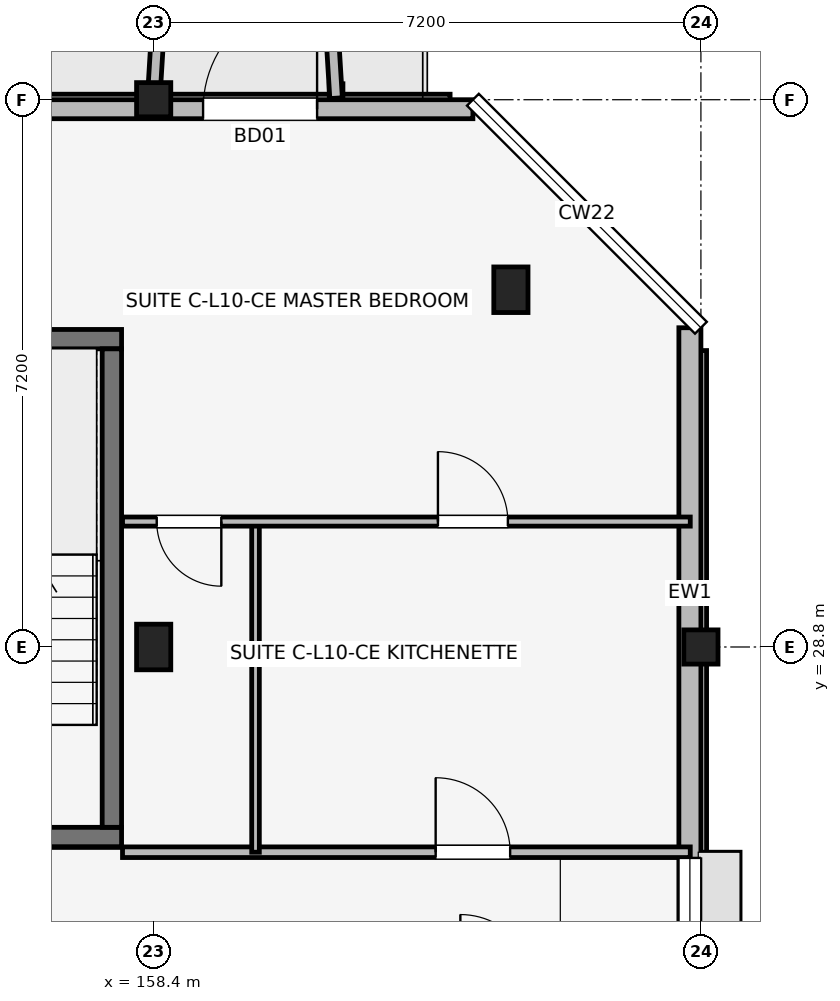
"""IFC4 building model, lengths in metres.
Left out: names, types, materials, properties, quantities, classifications, styles, units other than length and angle.
Written with IfcOpenShell. Run it as: python <this file> out.ifc"""

import sys

from ifc_helpers import new_model, si_unit, direction, frame, frame_2d, origin, origin_2d, place, context, subcontext, project, spatial, rectangle, extrude, element, fill, save


model = new_model("IFC4")
c1 = context("Model", 3, precision=1e-05, world=origin(), true_north=direction((0.0, 1.0)))
c2 = subcontext(c1, "Body", "Model", "MODEL_VIEW")
j1 = project(units=[si_unit("LENGTHUNIT", "METRE"), si_unit("PLANEANGLEUNIT", "RADIAN")], contexts=[c1])
p1 = place(None, origin())
s1 = spatial("IfcSite", under=j1, at=p1, CompositionType="ELEMENT")
p2 = place(p1, origin())
s2 = spatial("IfcBuilding", under=s1, at=p2, CompositionType="ELEMENT")
p3 = place(p2, frame((0.0, 0.0, 33.9)))
s3 = spatial("IfcBuildingStorey", under=s2, at=p3, CompositionType="ELEMENT", Elevation=33.9)
p4 = place(p3, frame((158.4, 28.8, 0.0), z_axis=(0.0, 0.0, 1.0), x_axis=(1.0, 0.0, 0.0)))
e1 = element("IfcColumn", 1, at=p4, inside=s3, PredefinedType="COLUMN", context=c2, shape_type="SweptSolid", body=[
    extrude(rectangle(XDim=0.45, YDim=0.6, at=origin_2d()), origin(), (0.0, 0.0, 1.0), 3.15),
])
for number, where, z_axis, x_axis in (
    (2, (158.4, 36.0, 0.0), (0.0, 0.0, 1.0), (1.0, 0.0, 0.0)),
    (3, (165.6, 28.8, 0.0), (0.0, 0.0, 1.0), (1.0, 0.0, 0.0)),
):
    element("IfcColumn", number, at=place(p3, frame(where, z_axis=z_axis, x_axis=x_axis)), inside=s3, PredefinedType="COLUMN", context=c2, shape_type="SweptSolid", body=[
        extrude(rectangle(XDim=0.45, YDim=0.45, at=origin_2d()), origin(), (0.0, 0.0, 1.0), 3.15),
    ])
p5 = place(p3, frame((163.1, 33.5, 0.0), z_axis=(0.0, 0.0, 1.0), x_axis=(1.0, 0.0, 0.0)))
e4 = element("IfcColumn", 4, at=p5, inside=s3, PredefinedType="COLUMN", context=c2, shape_type="SweptSolid", body=[
    extrude(rectangle(XDim=0.45, YDim=0.6, at=origin_2d()), origin(), (0.0, 0.0, 1.0), 3.15),
])
p6 = place(p3, frame((154.673, 26.3, 0.0), z_axis=(0.0, 0.0, 1.0), x_axis=(1.0, 0.0, 0.0)))
e5 = element("IfcWall", 5, at=p6, inside=s3, PredefinedType="SHEAR", context=c2, shape_type="SweptSolid", body=[
    extrude(rectangle(XDim=3.305, YDim=0.255, at=frame_2d((1.652, 0.0))), origin(), (0.0, 0.0, 1.0), 3.15),
])
p7 = place(p6, frame((1.127, 0.0, 0.0)))
e6 = element("IfcOpeningElement", 6, at=p7, cuts=e5, PredefinedType="OPENING", context=c2, shape_type="SweptSolid", body=[
    extrude(rectangle(XDim=1.05, YDim=2.12, at=frame_2d((0.525, 1.06))), frame((0.0, 0.137, 0.0), z_axis=(0.0, -1.0, 0.0), x_axis=(1.0, 0.0, 0.0)), (0.0, 0.0, 1.0), 0.275),
])
p8 = place(p3, frame((154.673, 32.85, 0.0), z_axis=(0.0, 0.0, 1.0), x_axis=(1.0, 0.0, 0.0)))
e7 = element("IfcWall", 7, at=p8, inside=s3, PredefinedType="SHEAR", context=c2, shape_type="SweptSolid", body=[
    extrude(rectangle(XDim=3.305, YDim=0.255, at=frame_2d((1.652, 0.0))), origin(), (0.0, 0.0, 1.0), 3.15),
])
p9 = place(p3, frame((157.85, 26.427, 0.0), z_axis=(0.0, 0.0, 1.0), x_axis=(0.0, 1.0, 0.0)))
e8 = element("IfcWall", 8, at=p9, inside=s3, PredefinedType="SHEAR", context=c2, shape_type="SweptSolid", body=[
    extrude(rectangle(XDim=6.295, YDim=0.255, at=frame_2d((3.147, 0.0))), origin(), (0.0, 0.0, 1.0), 3.15),
])
p10 = place(p3, frame((165.455, 17.4, 0.0), z_axis=(0.0, 0.0, 1.0), x_axis=(0.0, 1.0, 0.0)))
e9 = element("IfcWall", 9, at=p10, inside=s3, PredefinedType="SOLIDWALL", context=c2, shape_type="SweptSolid", body=[
    extrude(rectangle(XDim=15.6, YDim=0.29, at=frame_2d((7.8, 0.0))), origin(), (0.0, 0.0, 1.0), 2.48),
])
p11 = place(p10, frame((6.975, 0.0, 1.05)))
e10 = element("IfcOpeningElement", 10, at=p11, cuts=e9, PredefinedType="OPENING", context=c2, shape_type="SweptSolid", body=[
    extrude(rectangle(XDim=1.65, YDim=1.15, at=frame_2d((0.825, 0.575))), frame((0.0, 0.155, 0.0), z_axis=(0.0, -1.0, 0.0), x_axis=(1.0, 0.0, 0.0)), (0.0, 0.0, 1.0), 0.31),
])
p12 = place(p10, frame((1.255, 0.0, 0.75)))
e11 = element("IfcOpeningElement", 11, at=p12, cuts=e9, PredefinedType="OPENING", context=c2, shape_type="SweptSolid", body=[
    extrude(rectangle(XDim=1.42, YDim=1.6, at=frame_2d((0.71, 0.8))), frame((0.0, 0.155, 0.0), z_axis=(0.0, -1.0, 0.0), x_axis=(1.0, 0.0, 0.0)), (0.0, 0.0, 1.0), 0.31),
])
p13 = place(p3, frame((162.6, 35.875, 0.0), z_axis=(0.0, 0.0, 1.0), x_axis=(-1.0, 0.0, 0.0)))
e12 = element("IfcWall", 12, at=p13, inside=s3, PredefinedType="SOLIDWALL", context=c2, shape_type="SweptSolid", body=[
    extrude(rectangle(XDim=30.0, YDim=0.25, at=frame_2d((15.0, 0.0))), origin(), (0.0, 0.0, 1.0), 2.45),
])
p14 = place(p13, frame((27.95, 0.0, 0.0), z_axis=(0.0, 0.0, 1.0), x_axis=(-1.0, 0.0, 0.0)))
e13 = element("IfcOpeningElement", 13, at=p14, cuts=e12, PredefinedType="OPENING", context=c2, shape_type="SweptSolid", body=[
    extrude(rectangle(XDim=1.5, YDim=2.15, at=frame_2d((0.75, 1.075))), frame((0.0, 0.135, 0.0), z_axis=(0.0, -1.0, 0.0), x_axis=(1.0, 0.0, 0.0)), (0.0, 0.0, 1.0), 0.27),
])
p15 = place(p13, frame((3.55, 0.0, 0.0), z_axis=(0.0, 0.0, 1.0), x_axis=(-1.0, 0.0, 0.0)))
e14 = element("IfcOpeningElement", 14, at=p15, cuts=e12, PredefinedType="OPENING", context=c2, shape_type="SweptSolid", body=[
    extrude(rectangle(XDim=1.5, YDim=2.15, at=frame_2d((0.75, 1.075))), frame((0.0, 0.135, 0.0), z_axis=(0.0, -1.0, 0.0), x_axis=(1.0, 0.0, 0.0)), (0.0, 0.0, 1.0), 0.27),
])
p16 = place(p13, frame((14.55, 0.0, 0.5)))
e15 = element("IfcOpeningElement", 15, at=p16, cuts=e12, PredefinedType="OPENING", context=c2, shape_type="SweptSolid", body=[
    extrude(rectangle(XDim=0.9, YDim=1.8, at=frame_2d((0.45, 0.9))), frame((0.0, 0.135, 0.0), z_axis=(0.0, -1.0, 0.0), x_axis=(1.0, 0.0, 0.0)), (0.0, 0.0, 1.0), 0.27),
])
p17 = place(p13, frame((9.137, 0.0, 0.7)))
e16 = element("IfcOpeningElement", 16, at=p17, cuts=e12, PredefinedType="OPENING", context=c2, shape_type="SweptSolid", body=[
    extrude(rectangle(XDim=1.86, YDim=1.6, at=frame_2d((0.93, 0.8))), frame((0.0, 0.135, 0.0), z_axis=(0.0, -1.0, 0.0), x_axis=(1.0, 0.0, 0.0)), (0.0, 0.0, 1.0), 0.27),
])
p18 = place(p13, frame((19.002, 0.0, 0.7)))
e17 = element("IfcOpeningElement", 17, at=p18, cuts=e12, PredefinedType="OPENING", context=c2, shape_type="SweptSolid", body=[
    extrude(rectangle(XDim=1.86, YDim=1.6, at=frame_2d((0.93, 0.8))), frame((0.0, 0.135, 0.0), z_axis=(0.0, -1.0, 0.0), x_axis=(1.0, 0.0, 0.0)), (0.0, 0.0, 1.0), 0.27),
])
for number, where, z_axis, x_axis in (
    (18, (158.4, 36.02, 0.0), (0.0, 0.0, 1.0), (0.061, 0.998, 0.0)),
    (19, (160.8, 36.02, 0.0), (0.0, 0.0, 1.0), (-0.061, 0.998, 0.0)),
):
    element("IfcWall", number, at=place(p3, frame(where, z_axis=z_axis, x_axis=x_axis)), inside=s3, PredefinedType="ELEMENTEDWALL", context=c2, shape_type="SweptSolid", body=[
        extrude(rectangle(XDim=1.964, YDim=0.165, at=frame_2d((0.982, 0.0))), origin(), (0.0, 0.0, 1.0), 2.95),
    ])
p19 = place(p3, frame((157.99, 26.1, 0.0), z_axis=(0.0, 0.0, 1.0), x_axis=(1.0, 0.0, 0.0)))
e20 = element("IfcWall", 20, at=p19, inside=s3, PredefinedType="PARTITIONING", context=c2, shape_type="SweptSolid", body=[
    extrude(rectangle(XDim=7.47, YDim=0.14, at=frame_2d((3.735, 0.0))), origin(), (0.0, 0.0, 1.0), 2.38),
])
p20 = place(p19, frame((4.12, 0.0, 0.0)))
e21 = element("IfcOpeningElement", 21, at=p20, cuts=e20, PredefinedType="OPENING", context=c2, shape_type="SweptSolid", body=[
    extrude(rectangle(XDim=0.98, YDim=2.1, at=frame_2d((0.49, 1.05))), frame((0.0, 0.08, 0.0), z_axis=(0.0, -1.0, 0.0), x_axis=(1.0, 0.0, 0.0)), (0.0, 0.0, 1.0), 0.16),
])
p21 = place(p3, frame((159.74, 26.1, 0.0), z_axis=(0.0, 0.0, 1.0), x_axis=(0.0, 1.0, 0.0)))
e22 = element("IfcWall", 22, at=p21, inside=s3, PredefinedType="PARTITIONING", context=c2, shape_type="SweptSolid", body=[
    extrude(rectangle(XDim=4.35, YDim=0.1, at=frame_2d((2.175, 0.0))), origin(), (0.0, 0.0, 1.0), 2.38),
])
p22 = place(p3, frame((157.99, 30.45, 0.0), z_axis=(0.0, 0.0, 1.0), x_axis=(1.0, 0.0, 0.0)))
e23 = element("IfcWall", 23, at=p22, inside=s3, PredefinedType="PARTITIONING", context=c2, shape_type="SweptSolid", body=[
    extrude(rectangle(XDim=7.47, YDim=0.12, at=frame_2d((3.735, 0.0))), origin(), (0.0, 0.0, 1.0), 2.38),
])
p23 = place(p22, frame((1.3, 0.0, 0.0), z_axis=(0.0, 0.0, 1.0), x_axis=(-1.0, 0.0, 0.0)))
e24 = element("IfcOpeningElement", 24, at=p23, cuts=e23, PredefinedType="OPENING", context=c2, shape_type="SweptSolid", body=[
    extrude(rectangle(XDim=0.85, YDim=2.08, at=frame_2d((0.425, 1.04))), frame((0.0, 0.07, 0.0), z_axis=(0.0, -1.0, 0.0), x_axis=(1.0, 0.0, 0.0)), (0.0, 0.0, 1.0), 0.14),
])
p24 = place(p22, frame((4.15, 0.0, 0.0)))
e25 = element("IfcOpeningElement", 25, at=p24, cuts=e23, PredefinedType="OPENING", context=c2, shape_type="SweptSolid", body=[
    extrude(rectangle(XDim=0.92, YDim=2.08, at=frame_2d((0.46, 1.04))), frame((0.0, 0.07, 0.0), z_axis=(0.0, -1.0, 0.0), x_axis=(1.0, 0.0, 0.0)), (0.0, 0.0, 1.0), 0.14),
])
p25 = place(p15, origin())
e26 = element("IfcDoor", 26, at=p25, inside=s3, OperationType="SINGLE_SWING_LEFT", PredefinedType="DOOR", context=c2, shape_type="SweptSolid", body=[
    extrude(rectangle(XDim=1.5, YDim=2.15, at=frame_2d((0.75, 1.075))), frame((0.0, 0.025, 0.0), z_axis=(0.0, -1.0, 0.0), x_axis=(1.0, 0.0, 0.0)), (0.0, 0.0, 1.0), 0.05),
])
fill(e14, e26)
p26 = place(p11, origin())
e27 = element("IfcWindow", 27, at=p26, inside=s3, PartitioningType="SINGLE_PANEL", PredefinedType="WINDOW", context=c2, shape_type="SweptSolid", body=[
    extrude(rectangle(XDim=1.65, YDim=1.15, at=frame_2d((0.825, 0.575))), frame((0.0, 0.03, 0.0), z_axis=(0.0, -1.0, 0.0), x_axis=(1.0, 0.0, 0.0)), (0.0, 0.0, 1.0), 0.06),
])
fill(e10, e27)
p27 = place(p20, origin())
e28 = element("IfcDoor", 28, at=p27, inside=s3, OperationType="SINGLE_SWING_LEFT", PredefinedType="DOOR", context=c2, shape_type="SweptSolid", body=[
    extrude(rectangle(XDim=0.98, YDim=2.1, at=frame_2d((0.49, 1.05))), frame((0.0, 0.025, 0.0), z_axis=(0.0, -1.0, 0.0), x_axis=(1.0, 0.0, 0.0)), (0.0, 0.0, 1.0), 0.05),
])
fill(e21, e28)
p28 = place(p23, origin())
e29 = element("IfcDoor", 29, at=p28, inside=s3, OperationType="SINGLE_SWING_RIGHT", PredefinedType="DOOR", context=c2, shape_type="SweptSolid", body=[
    extrude(rectangle(XDim=0.85, YDim=2.08, at=frame_2d((0.425, 1.04))), frame((0.0, 0.025, 0.0), z_axis=(0.0, -1.0, 0.0), x_axis=(1.0, 0.0, 0.0)), (0.0, 0.0, 1.0), 0.05),
])
fill(e24, e29)
p29 = place(p24, origin())
e30 = element("IfcDoor", 30, at=p29, inside=s3, OperationType="SINGLE_SWING_LEFT", PredefinedType="DOOR", context=c2, shape_type="SweptSolid", body=[
    extrude(rectangle(XDim=0.92, YDim=2.08, at=frame_2d((0.46, 1.04))), frame((0.0, 0.025, 0.0), z_axis=(0.0, -1.0, 0.0), x_axis=(1.0, 0.0, 0.0)), (0.0, 0.0, 1.0), 0.05),
])
fill(e25, e30)
save(model, sys.argv[1])
